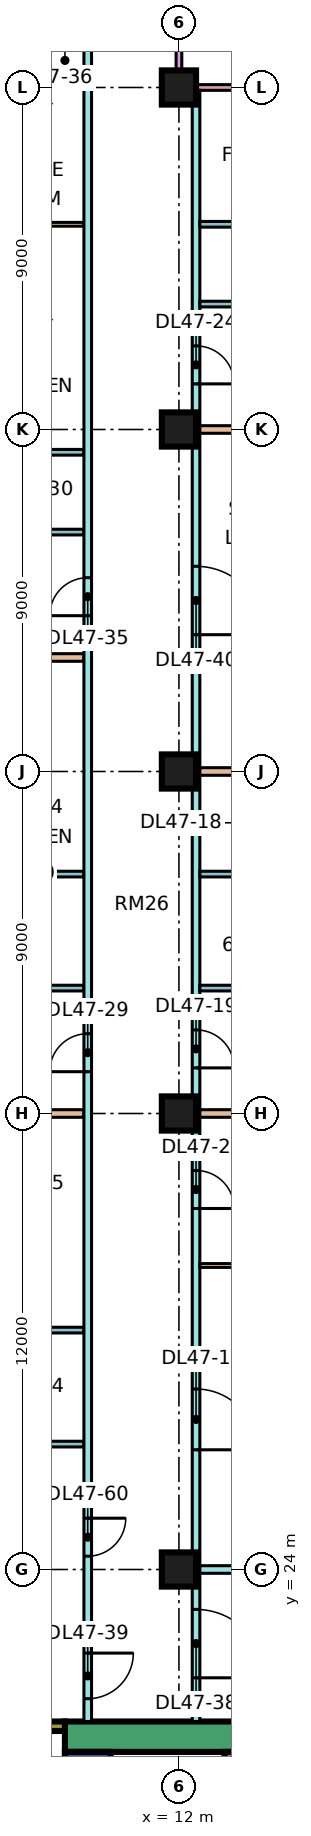
"""IFC4 building model, lengths in metres.
Left out: names, types, materials, properties, quantities, classifications, styles, units other than length and angle.
Written with IfcOpenShell. Run it as: python <this file> out.ifc"""

import sys

from ifc_helpers import new_model, si_unit, direction, frame, frame_2d, origin, origin_2d, place, context, subcontext, project, spatial, rectangle, extrude, element, fill, save


model = new_model("IFC4")
c1 = context("Model", 3, precision=1e-05, world=origin(), true_north=direction((0.0, 1.0)))
c2 = subcontext(c1, "Body", "Model", "MODEL_VIEW")
j1 = project(units=[si_unit("LENGTHUNIT", "METRE"), si_unit("PLANEANGLEUNIT", "RADIAN")], contexts=[c1])
p1 = place(None, origin())
s1 = spatial("IfcSite", under=j1, at=p1, CompositionType="ELEMENT")
p2 = place(p1, origin())
s2 = spatial("IfcBuilding", under=s1, at=p2, CompositionType="ELEMENT")
p3 = place(p2, frame((0.0, 0.0, 202.4)))
s3 = spatial("IfcBuildingStorey", under=s2, at=p3, CompositionType="ELEMENT", Elevation=202.4)
for number, where, z_axis, x_axis in (
    (1, (12.0, 24.0, 0.0), (0.0, 0.0, 1.0), (1.0, 0.0, 0.0)),
    (2, (12.0, 36.0, 0.0), (0.0, 0.0, 1.0), (1.0, 0.0, 0.0)),
    (3, (12.0, 45.0, 0.0), (0.0, 0.0, 1.0), (1.0, 0.0, 0.0)),
    (4, (12.0, 54.0, 0.0), (0.0, 0.0, 1.0), (1.0, 0.0, 0.0)),
    (5, (12.0, 63.0, 0.0), (0.0, 0.0, 1.0), (1.0, 0.0, 0.0)),
):
    element("IfcColumn", number, at=place(p3, frame(where, z_axis=z_axis, x_axis=x_axis)), inside=s3, PredefinedType="COLUMN", context=c2, shape_type="SweptSolid", body=[
        extrude(rectangle(XDim=0.9, YDim=0.9, at=origin_2d()), origin(), (0.0, 0.0, 1.0), 3.75),
    ])
p4 = place(p3, frame((9.0, 19.6, 0.0), z_axis=(0.0, 0.0, 1.0), x_axis=(1.0, 0.0, 0.0)))
e6 = element("IfcWall", 6, at=p4, inside=s3, PredefinedType="SHEAR", context=c2, shape_type="SweptSolid", body=[
    extrude(rectangle(XDim=25.0, YDim=0.8, at=frame_2d((12.5, 0.0))), origin(), (0.0, 0.0, 1.0), 3.75),
])
p5 = place(p4, frame((19.1, 0.0, 0.0)))
e7 = element("IfcOpeningElement", 7, at=p5, cuts=e6, PredefinedType="OPENING", context=c2, shape_type="SweptSolid", body=[
    extrude(rectangle(XDim=1.8, YDim=2.4, at=frame_2d((0.9, 1.2))), frame((0.0, 0.41, 0.0), z_axis=(0.0, -1.0, 0.0), x_axis=(1.0, 0.0, 0.0)), (0.0, 0.0, 1.0), 0.82),
])
p6 = place(p3, frame((9.6, 7.8, 0.0), z_axis=(0.0, 0.0, 1.0), x_axis=(0.0, 1.0, 0.0)))
e8 = element("IfcWall", 8, at=p6, inside=s3, PredefinedType="SHEAR", context=c2, shape_type="SweptSolid", body=[
    extrude(rectangle(XDim=11.4, YDim=1.2, at=frame_2d((5.7, 0.0))), origin(), (0.0, 0.0, 1.0), 3.75),
])
p7 = place(p6, frame((4.075, 0.0, 0.0)))
e9 = element("IfcOpeningElement", 9, at=p7, cuts=e8, PredefinedType="OPENING", context=c2, shape_type="SweptSolid", body=[
    extrude(rectangle(XDim=1.1, YDim=2.2, at=frame_2d((0.55, 1.1))), frame((0.0, 0.61, 0.0), z_axis=(0.0, -1.0, 0.0), x_axis=(1.0, 0.0, 0.0)), (0.0, 0.0, 1.0), 1.22),
])
p8 = place(p6, frame((6.575, 0.0, 0.0)))
e10 = element("IfcOpeningElement", 10, at=p8, cuts=e8, PredefinedType="OPENING", context=c2, shape_type="SweptSolid", body=[
    extrude(rectangle(XDim=1.1, YDim=2.2, at=frame_2d((0.55, 1.1))), frame((0.0, 0.61, 0.0), z_axis=(0.0, -1.0, 0.0), x_axis=(1.0, 0.0, 0.0)), (0.0, 0.0, 1.0), 1.22),
])
p9 = place(p6, frame((9.4, 0.0, 0.0)))
e11 = element("IfcOpeningElement", 11, at=p9, cuts=e8, PredefinedType="OPENING", context=c2, shape_type="SweptSolid", body=[
    extrude(rectangle(XDim=1.1, YDim=2.2, at=frame_2d((0.55, 1.1))), frame((0.0, 0.61, 0.0), z_axis=(0.0, -1.0, 0.0), x_axis=(1.0, 0.0, 0.0)), (0.0, 0.0, 1.0), 1.22),
])
p10 = place(p6, frame((1.75, 0.0, 0.0)))
e12 = element("IfcOpeningElement", 12, at=p10, cuts=e8, PredefinedType="OPENING", context=c2, shape_type="SweptSolid", body=[
    extrude(rectangle(XDim=0.9, YDim=2.1, at=frame_2d((0.45, 1.05))), frame((0.0, 0.61, 0.0), z_axis=(0.0, -1.0, 0.0), x_axis=(1.0, 0.0, 0.0)), (0.0, 0.0, 1.0), 1.22),
])
p11 = place(p3, frame((13.325, 7.8, 0.0), z_axis=(0.0, 0.0, 1.0), x_axis=(0.0, 1.0, 0.0)))
e13 = element("IfcWall", 13, at=p11, inside=s3, PredefinedType="SHEAR", context=c2, shape_type="SweptSolid", body=[
    extrude(rectangle(XDim=11.4, YDim=0.25, at=frame_2d((5.7, 0.0))), origin(), (0.0, 0.0, 1.0), 3.75),
])
p12 = place(p3, frame((2.1, 19.875, 0.0), z_axis=(0.0, 0.0, 1.0), x_axis=(1.0, 0.0, 0.0)))
e14 = element("IfcWall", 14, at=p12, inside=s3, PredefinedType="SHEAR", context=c2, shape_type="SweptSolid", body=[
    extrude(rectangle(XDim=6.9, YDim=0.25, at=frame_2d((3.45, 0.0))), origin(), (0.0, 0.0, 1.0), 3.75),
])
p13 = place(p12, frame((1.175, 0.0, 0.0)))
e15 = element("IfcOpeningElement", 15, at=p13, cuts=e14, PredefinedType="OPENING", context=c2, shape_type="SweptSolid", body=[
    extrude(rectangle(XDim=1.1, YDim=2.2, at=frame_2d((0.55, 1.1))), frame((0.0, 0.135, 0.0), z_axis=(0.0, -1.0, 0.0), x_axis=(1.0, 0.0, 0.0)), (0.0, 0.0, 1.0), 0.27),
])
p14 = place(p12, frame((4.6, 0.0, 0.0)))
e16 = element("IfcOpeningElement", 16, at=p14, cuts=e14, PredefinedType="OPENING", context=c2, shape_type="SweptSolid", body=[
    extrude(rectangle(XDim=1.2, YDim=2.2, at=frame_2d((0.6, 1.1))), frame((0.0, 0.135, 0.0), z_axis=(0.0, -1.0, 0.0), x_axis=(1.0, 0.0, 0.0)), (0.0, 0.0, 1.0), 0.27),
])
p15 = place(p3, frame((22.425, 63.0, 0.0), z_axis=(0.0, 0.0, 1.0), x_axis=(-1.0, 0.0, 0.0)))
e17 = element("IfcWall", 17, at=p15, inside=s3, PredefinedType="SOLIDWALL", context=c2, shape_type="SweptSolid", body=[
    extrude(rectangle(XDim=10.35, YDim=0.15, at=frame_2d((5.175, 0.0))), origin(), (0.0, 0.0, 1.0), 3.3),
])
p16 = place(p15, frame((0.788, 0.0, 0.0)))
e18 = element("IfcOpeningElement", 18, at=p16, cuts=e17, PredefinedType="OPENING", context=c2, shape_type="SweptSolid", body=[
    extrude(rectangle(XDim=1.8, YDim=2.4, at=frame_2d((0.9, 1.2))), frame((0.0, 0.085, 0.0), z_axis=(0.0, -1.0, 0.0), x_axis=(1.0, 0.0, 0.0)), (0.0, 0.0, 1.0), 0.17),
])
p17 = place(p15, frame((5.725, 0.0, 0.45)))
e19 = element("IfcOpeningElement", 19, at=p17, cuts=e17, PredefinedType="OPENING", context=c2, shape_type="SweptSolid", body=[
    extrude(rectangle(XDim=3.0, YDim=2.4, at=frame_2d((1.5, 1.2))), frame((0.0, 0.085, 0.0), z_axis=(0.0, -1.0, 0.0), x_axis=(1.0, 0.0, 0.0)), (0.0, 0.0, 1.0), 0.17),
])
p18 = place(p3, frame((12.0, 64.5, 0.0), z_axis=(0.0, 0.0, 1.0), x_axis=(0.0, -1.0, 0.0)))
e20 = element("IfcWall", 20, at=p18, inside=s3, PredefinedType="SOLIDWALL", context=c2, shape_type="SweptSolid", body=[
    extrude(rectangle(XDim=1.5, YDim=0.15, at=frame_2d((0.75, 0.0))), origin(), (0.0, 0.0, 1.0), 3.3),
])
p19 = place(p3, frame((0.0, 48.0, 0.0), z_axis=(0.0, 0.0, 1.0), x_axis=(1.0, 0.0, 0.0)))
e21 = element("IfcWall", 21, at=p19, inside=s3, PredefinedType="PARTITIONING", context=c2, shape_type="SweptSolid", body=[
    extrude(rectangle(XDim=9.5, YDim=0.2, at=frame_2d((4.75, 0.0))), origin(), (0.0, 0.0, 1.0), 3.3),
])
p20 = place(p3, frame((0.074, 22.4, 0.0), z_axis=(0.0, 0.0, 1.0), x_axis=(1.0, 0.0, 0.0)))
e22 = element("IfcWall", 22, at=p20, inside=s3, PredefinedType="PARTITIONING", context=c2, shape_type="SweptSolid", body=[
    extrude(rectangle(XDim=9.426, YDim=0.2, at=frame_2d((4.713, 0.0))), origin(), (0.0, 0.0, 1.0), 3.3),
])
p21 = place(p3, frame((5.65, 36.0, 0.0), z_axis=(0.0, 0.0, 1.0), x_axis=(1.0, 0.0, 0.0)))
e23 = element("IfcWall", 23, at=p21, inside=s3, PredefinedType="PARTITIONING", context=c2, shape_type="SweptSolid", body=[
    extrude(rectangle(XDim=3.85, YDim=0.2, at=frame_2d((1.925, 0.0))), origin(), (0.0, 0.0, 1.0), 3.3),
])
for number, where, z_axis, x_axis in (
    (24, (6.675, 39.3, 0.0), (0.0, 0.0, 1.0), (1.0, 0.0, 0.0)),
    (25, (6.675, 42.3, 0.0), (0.0, 0.0, 1.0), (1.0, 0.0, 0.0)),
):
    element("IfcWall", number, at=place(p3, frame(where, z_axis=z_axis, x_axis=x_axis)), inside=s3, PredefinedType="PARTITIONING", context=c2, shape_type="SweptSolid", body=[
        extrude(rectangle(XDim=2.825, YDim=0.15, at=frame_2d((1.413, 0.0))), origin(), (0.0, 0.0, 1.0), 3.3),
    ])
p22 = place(p3, frame((6.675, 51.3, 0.0), z_axis=(0.0, 0.0, 1.0), x_axis=(1.0, 0.0, 0.0)))
e26 = element("IfcWall", 26, at=p22, inside=s3, PredefinedType="PARTITIONING", context=c2, shape_type="SweptSolid", body=[
    extrude(rectangle(XDim=2.825, YDim=0.15, at=frame_2d((1.413, 0.0))), origin(), (0.0, 0.0, 1.0), 3.3),
])
p23 = place(p22, frame((1.075, 0.0, 0.0)))
e27 = element("IfcOpeningElement", 27, at=p23, cuts=e26, PredefinedType="OPENING", context=c2, shape_type="SweptSolid", body=[
    extrude(rectangle(XDim=0.8, YDim=2.1, at=frame_2d((0.4, 1.05))), frame((0.0, 0.085, 0.0), z_axis=(0.0, -1.0, 0.0), x_axis=(1.0, 0.0, 0.0)), (0.0, 0.0, 1.0), 0.17),
])
p24 = place(p3, frame((6.675, 53.4, 0.0), z_axis=(0.0, 0.0, 1.0), x_axis=(1.0, 0.0, 0.0)))
e28 = element("IfcWall", 28, at=p24, inside=s3, PredefinedType="PARTITIONING", context=c2, shape_type="SweptSolid", body=[
    extrude(rectangle(XDim=2.825, YDim=0.15, at=frame_2d((1.413, 0.0))), origin(), (0.0, 0.0, 1.0), 3.3),
])
p25 = place(p3, frame((6.675, 59.4, 0.0), z_axis=(0.0, 0.0, 1.0), x_axis=(1.0, 0.0, 0.0)))
e29 = element("IfcWall", 29, at=p25, inside=s3, PredefinedType="PARTITIONING", context=c2, shape_type="SweptSolid", body=[
    extrude(rectangle(XDim=2.825, YDim=0.1, at=frame_2d((1.413, 0.0))), origin(), (0.0, 0.0, 1.0), 3.3),
])
for number, where, z_axis, x_axis in (
    (30, (6.975, 27.3, 0.0), (0.0, 0.0, 1.0), (1.0, 0.0, 0.0)),
    (31, (6.975, 30.3, 0.0), (0.0, 0.0, 1.0), (1.0, 0.0, 0.0)),
):
    element("IfcWall", number, at=place(p3, frame(where, z_axis=z_axis, x_axis=x_axis)), inside=s3, PredefinedType="PARTITIONING", context=c2, shape_type="SweptSolid", body=[
        extrude(rectangle(XDim=2.525, YDim=0.15, at=frame_2d((1.262, 0.0))), origin(), (0.0, 0.0, 1.0), 3.3),
    ])
p26 = place(p3, frame((9.6, 20.0, 0.0), z_axis=(0.0, 0.0, 1.0), x_axis=(0.0, 1.0, 0.0)))
e32 = element("IfcWall", 32, at=p26, inside=s3, PredefinedType="PARTITIONING", context=c2, shape_type="SweptSolid", body=[
    extrude(rectangle(XDim=44.35, YDim=0.2, at=frame_2d((22.175, 0.0))), origin(), (0.0, 0.0, 1.0), 3.3),
])
p27 = place(p26, frame((17.1, 0.0, 0.0)))
e33 = element("IfcOpeningElement", 33, at=p27, cuts=e32, PredefinedType="OPENING", context=c2, shape_type="SweptSolid", body=[
    extrude(rectangle(XDim=1.0, YDim=2.1, at=frame_2d((0.5, 1.05))), frame((0.0, 0.11, 0.0), z_axis=(0.0, -1.0, 0.0), x_axis=(1.0, 0.0, 0.0)), (0.0, 0.0, 1.0), 0.22),
])
p28 = place(p26, frame((29.1, 0.0, 0.0)))
e34 = element("IfcOpeningElement", 34, at=p28, cuts=e32, PredefinedType="OPENING", context=c2, shape_type="SweptSolid", body=[
    extrude(rectangle(XDim=1.0, YDim=2.1, at=frame_2d((0.5, 1.05))), frame((0.0, 0.11, 0.0), z_axis=(0.0, -1.0, 0.0), x_axis=(1.0, 0.0, 0.0)), (0.0, 0.0, 1.0), 0.22),
])
p29 = place(p26, frame((0.6, 0.0, 0.0)))
e35 = element("IfcOpeningElement", 35, at=p29, cuts=e32, PredefinedType="OPENING", context=c2, shape_type="SweptSolid", body=[
    extrude(rectangle(XDim=1.2, YDim=2.1, at=frame_2d((0.6, 1.05))), frame((0.0, 0.11, 0.0), z_axis=(0.0, -1.0, 0.0), x_axis=(1.0, 0.0, 0.0)), (0.0, 0.0, 1.0), 0.22),
])
p30 = place(p26, frame((4.35, 0.0, 0.0)))
e36 = element("IfcOpeningElement", 36, at=p30, cuts=e32, PredefinedType="OPENING", context=c2, shape_type="SweptSolid", body=[
    extrude(rectangle(XDim=1.0, YDim=2.1, at=frame_2d((0.5, 1.05))), frame((0.0, 0.11, 0.0), z_axis=(0.0, -1.0, 0.0), x_axis=(1.0, 0.0, 0.0)), (0.0, 0.0, 1.0), 0.22),
])
p31 = place(p3, frame((12.45, 20.0, 0.0), z_axis=(0.0, 0.0, 1.0), x_axis=(0.0, 1.0, 0.0)))
e37 = element("IfcWall", 37, at=p31, inside=s3, PredefinedType="PARTITIONING", context=c2, shape_type="SweptSolid", body=[
    extrude(rectangle(XDim=42.926, YDim=0.2, at=frame_2d((21.463, 0.0))), origin(), (0.0, 0.0, 1.0), 3.3),
])
p32 = place(p31, frame((7.15, 0.0, 0.0)))
e38 = element("IfcOpeningElement", 38, at=p32, cuts=e37, PredefinedType="OPENING", context=c2, shape_type="SweptSolid", body=[
    extrude(rectangle(XDim=1.6, YDim=2.1, at=frame_2d((0.8, 1.05))), frame((0.0, 0.11, 0.0), z_axis=(0.0, -1.0, 0.0), x_axis=(1.0, 0.0, 0.0)), (0.0, 0.0, 1.0), 0.22),
])
p33 = place(p31, frame((13.5, 0.0, 0.0)))
e39 = element("IfcOpeningElement", 39, at=p33, cuts=e37, PredefinedType="OPENING", context=c2, shape_type="SweptSolid", body=[
    extrude(rectangle(XDim=1.0, YDim=2.1, at=frame_2d((0.5, 1.05))), frame((0.0, 0.11, 0.0), z_axis=(0.0, -1.0, 0.0), x_axis=(1.0, 0.0, 0.0)), (0.0, 0.0, 1.0), 0.22),
])
p34 = place(p31, frame((17.2, 0.0, 0.0)))
e40 = element("IfcOpeningElement", 40, at=p34, cuts=e37, PredefinedType="OPENING", context=c2, shape_type="SweptSolid", body=[
    extrude(rectangle(XDim=1.0, YDim=2.1, at=frame_2d((0.5, 1.05))), frame((0.0, 0.11, 0.0), z_axis=(0.0, -1.0, 0.0), x_axis=(1.0, 0.0, 0.0)), (0.0, 0.0, 1.0), 0.22),
])
p35 = place(p31, frame((35.2, 0.0, 0.0)))
e41 = element("IfcOpeningElement", 41, at=p35, cuts=e37, PredefinedType="OPENING", context=c2, shape_type="SweptSolid", body=[
    extrude(rectangle(XDim=1.0, YDim=2.1, at=frame_2d((0.5, 1.05))), frame((0.0, 0.11, 0.0), z_axis=(0.0, -1.0, 0.0), x_axis=(1.0, 0.0, 0.0)), (0.0, 0.0, 1.0), 0.22),
])
p36 = place(p31, frame((1.15, 0.0, 0.0)))
e42 = element("IfcOpeningElement", 42, at=p36, cuts=e37, PredefinedType="OPENING", context=c2, shape_type="SweptSolid", body=[
    extrude(rectangle(XDim=1.8, YDim=2.1, at=frame_2d((0.9, 1.05))), frame((0.0, 0.11, 0.0), z_axis=(0.0, -1.0, 0.0), x_axis=(1.0, 0.0, 0.0)), (0.0, 0.0, 1.0), 0.22),
])
p37 = place(p31, frame((28.6, 0.0, 0.0)))
e43 = element("IfcOpeningElement", 43, at=p37, cuts=e37, PredefinedType="OPENING", context=c2, shape_type="SweptSolid", body=[
    extrude(rectangle(XDim=1.8, YDim=2.1, at=frame_2d((0.9, 1.05))), frame((0.0, 0.11, 0.0), z_axis=(0.0, -1.0, 0.0), x_axis=(1.0, 0.0, 0.0)), (0.0, 0.0, 1.0), 0.22),
])
p38 = place(p3, frame((12.55, 24.0, 0.0), z_axis=(0.0, 0.0, 1.0), x_axis=(1.0, 0.0, 0.0)))
e44 = element("IfcWall", 44, at=p38, inside=s3, PredefinedType="PARTITIONING", context=c2, shape_type="SweptSolid", body=[
    extrude(rectangle(XDim=8.95, YDim=0.2, at=frame_2d((4.475, 0.0))), origin(), (0.0, 0.0, 1.0), 3.3),
])
p39 = place(p3, frame((12.55, 32.0, 0.0), z_axis=(0.0, 0.0, 1.0), x_axis=(1.0, 0.0, 0.0)))
e45 = element("IfcWall", 45, at=p39, inside=s3, PredefinedType="PARTITIONING", context=c2, shape_type="SweptSolid", body=[
    extrude(rectangle(XDim=8.95, YDim=0.1, at=frame_2d((4.475, 0.0))), origin(), (0.0, 0.0, 1.0), 3.3),
])
p40 = place(p3, frame((12.55, 36.0, 0.0), z_axis=(0.0, 0.0, 1.0), x_axis=(1.0, 0.0, 0.0)))
e46 = element("IfcWall", 46, at=p40, inside=s3, PredefinedType="PARTITIONING", context=c2, shape_type="SweptSolid", body=[
    extrude(rectangle(XDim=11.45, YDim=0.2, at=frame_2d((5.725, 0.0))), origin(), (0.0, 0.0, 1.0), 3.3),
])
for number, where, z_axis, x_axis in (
    (47, (12.55, 39.3, 0.0), (0.0, 0.0, 1.0), (1.0, 0.0, 0.0)),
    (48, (12.55, 42.3, 0.0), (0.0, 0.0, 1.0), (1.0, 0.0, 0.0)),
):
    element("IfcWall", number, at=place(p3, frame(where, z_axis=z_axis, x_axis=x_axis)), inside=s3, PredefinedType="PARTITIONING", context=c2, shape_type="SweptSolid", body=[
        extrude(rectangle(XDim=4.625, YDim=0.15, at=frame_2d((2.312, 0.0))), origin(), (0.0, 0.0, 1.0), 3.3),
    ])
p41 = place(p3, frame((12.55, 45.0, 0.0), z_axis=(0.0, 0.0, 1.0), x_axis=(1.0, 0.0, 0.0)))
e49 = element("IfcWall", 49, at=p41, inside=s3, PredefinedType="PARTITIONING", context=c2, shape_type="SweptSolid", body=[
    extrude(rectangle(XDim=11.376, YDim=0.2, at=frame_2d((5.688, 0.0))), origin(), (0.0, 0.0, 1.0), 3.3),
])
p42 = place(p3, frame((12.55, 54.0, 0.0), z_axis=(0.0, 0.0, 1.0), x_axis=(1.0, 0.0, 0.0)))
e50 = element("IfcWall", 50, at=p42, inside=s3, PredefinedType="PARTITIONING", context=c2, shape_type="SweptSolid", body=[
    extrude(rectangle(XDim=11.45, YDim=0.2, at=frame_2d((5.725, 0.0))), origin(), (0.0, 0.0, 1.0), 3.3),
])
for number, where, z_axis, x_axis in (
    (51, (12.55, 57.3, 0.0), (0.0, 0.0, 1.0), (1.0, 0.0, 0.0)),
    (52, (12.55, 59.4, 0.0), (0.0, 0.0, 1.0), (1.0, 0.0, 0.0)),
):
    element("IfcWall", number, at=place(p3, frame(where, z_axis=z_axis, x_axis=x_axis)), inside=s3, PredefinedType="PARTITIONING", context=c2, shape_type="SweptSolid", body=[
        extrude(rectangle(XDim=5.225, YDim=0.15, at=frame_2d((2.612, 0.0))), origin(), (0.0, 0.0, 1.0), 3.3),
    ])
p43 = place(p32, frame((1.6, 0.0, 0.0), z_axis=(0.0, 0.0, 1.0), x_axis=(-1.0, 0.0, 0.0)))
e53 = element("IfcDoor", 53, at=p43, inside=s3, OperationType="DOUBLE_DOOR_SINGLE_SWING", PredefinedType="DOOR", context=c2, shape_type="SweptSolid", body=[
    extrude(rectangle(XDim=1.6, YDim=2.1, at=frame_2d((0.8, 1.05))), frame((0.0, 0.025, 0.0), z_axis=(0.0, -1.0, 0.0), x_axis=(1.0, 0.0, 0.0)), (0.0, 0.0, 1.0), 0.05),
])
fill(e38, e53)
p44 = place(p33, frame((1.0, 0.0, 0.0), z_axis=(0.0, 0.0, 1.0), x_axis=(-1.0, 0.0, 0.0)))
e54 = element("IfcDoor", 54, at=p44, inside=s3, OperationType="SINGLE_SWING_LEFT", PredefinedType="DOOR", context=c2, shape_type="SweptSolid", body=[
    extrude(rectangle(XDim=1.0, YDim=2.1, at=frame_2d((0.5, 1.05))), frame((0.0, 0.025, 0.0), z_axis=(0.0, -1.0, 0.0), x_axis=(1.0, 0.0, 0.0)), (0.0, 0.0, 1.0), 0.05),
])
fill(e39, e54)
p45 = place(p34, frame((1.0, 0.0, 0.0), z_axis=(0.0, 0.0, 1.0), x_axis=(-1.0, 0.0, 0.0)))
e55 = element("IfcDoor", 55, at=p45, inside=s3, OperationType="SINGLE_SWING_LEFT", PredefinedType="DOOR", context=c2, shape_type="SweptSolid", body=[
    extrude(rectangle(XDim=1.0, YDim=2.1, at=frame_2d((0.5, 1.05))), frame((0.0, 0.025, 0.0), z_axis=(0.0, -1.0, 0.0), x_axis=(1.0, 0.0, 0.0)), (0.0, 0.0, 1.0), 0.05),
])
fill(e40, e55)
p46 = place(p35, frame((1.0, 0.0, 0.0), z_axis=(0.0, 0.0, 1.0), x_axis=(-1.0, 0.0, 0.0)))
e56 = element("IfcDoor", 56, at=p46, inside=s3, OperationType="SINGLE_SWING_LEFT", PredefinedType="DOOR", context=c2, shape_type="SweptSolid", body=[
    extrude(rectangle(XDim=1.0, YDim=2.1, at=frame_2d((0.5, 1.05))), frame((0.0, 0.025, 0.0), z_axis=(0.0, -1.0, 0.0), x_axis=(1.0, 0.0, 0.0)), (0.0, 0.0, 1.0), 0.05),
])
fill(e41, e56)
p47 = place(p27, origin())
e57 = element("IfcDoor", 57, at=p47, inside=s3, OperationType="SINGLE_SWING_LEFT", PredefinedType="DOOR", context=c2, shape_type="SweptSolid", body=[
    extrude(rectangle(XDim=1.0, YDim=2.1, at=frame_2d((0.5, 1.05))), frame((0.0, 0.025, 0.0), z_axis=(0.0, -1.0, 0.0), x_axis=(1.0, 0.0, 0.0)), (0.0, 0.0, 1.0), 0.05),
])
fill(e33, e57)
p48 = place(p28, origin())
e58 = element("IfcDoor", 58, at=p48, inside=s3, OperationType="SINGLE_SWING_LEFT", PredefinedType="DOOR", context=c2, shape_type="SweptSolid", body=[
    extrude(rectangle(XDim=1.0, YDim=2.1, at=frame_2d((0.5, 1.05))), frame((0.0, 0.025, 0.0), z_axis=(0.0, -1.0, 0.0), x_axis=(1.0, 0.0, 0.0)), (0.0, 0.0, 1.0), 0.05),
])
fill(e34, e58)
p49 = place(p36, frame((1.8, 0.0, 0.0), z_axis=(0.0, 0.0, 1.0), x_axis=(-1.0, 0.0, 0.0)))
e59 = element("IfcDoor", 59, at=p49, inside=s3, OperationType="DOUBLE_DOOR_SINGLE_SWING", PredefinedType="DOOR", context=c2, shape_type="SweptSolid", body=[
    extrude(rectangle(XDim=1.8, YDim=2.1, at=frame_2d((0.9, 1.05))), frame((0.0, 0.025, 0.0), z_axis=(0.0, -1.0, 0.0), x_axis=(1.0, 0.0, 0.0)), (0.0, 0.0, 1.0), 0.05),
])
fill(e42, e59)
p50 = place(p29, origin())
e60 = element("IfcDoor", 60, at=p50, inside=s3, OperationType="SINGLE_SWING_RIGHT", PredefinedType="DOOR", context=c2, shape_type="SweptSolid", body=[
    extrude(rectangle(XDim=1.2, YDim=2.1, at=frame_2d((0.6, 1.05))), frame((0.0, 0.025, 0.0), z_axis=(0.0, -1.0, 0.0), x_axis=(1.0, 0.0, 0.0)), (0.0, 0.0, 1.0), 0.05),
])
fill(e35, e60)
p51 = place(p37, frame((1.8, 0.0, 0.0), z_axis=(0.0, 0.0, 1.0), x_axis=(-1.0, 0.0, 0.0)))
e61 = element("IfcDoor", 61, at=p51, inside=s3, OperationType="DOUBLE_DOOR_SINGLE_SWING", PredefinedType="DOOR", context=c2, shape_type="SweptSolid", body=[
    extrude(rectangle(XDim=1.8, YDim=2.1, at=frame_2d((0.9, 1.05))), frame((0.0, 0.025, 0.0), z_axis=(0.0, -1.0, 0.0), x_axis=(1.0, 0.0, 0.0)), (0.0, 0.0, 1.0), 0.05),
])
fill(e43, e61)
p52 = place(p30, origin())
e62 = element("IfcDoor", 62, at=p52, inside=s3, OperationType="SINGLE_SWING_RIGHT", PredefinedType="DOOR", context=c2, shape_type="SweptSolid", body=[
    extrude(rectangle(XDim=1.0, YDim=2.1, at=frame_2d((0.5, 1.05))), frame((0.0, 0.025, 0.0), z_axis=(0.0, -1.0, 0.0), x_axis=(1.0, 0.0, 0.0)), (0.0, 0.0, 1.0), 0.05),
])
fill(e36, e62)
save(model, sys.argv[1])
